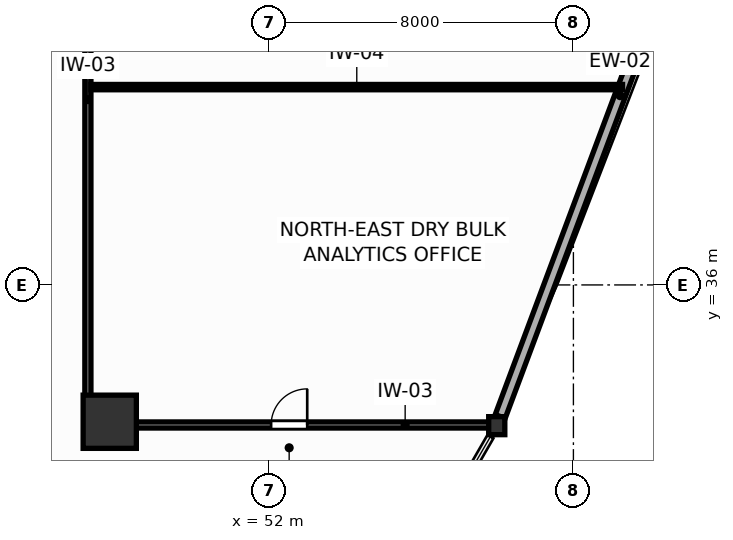
"""IFC4 building model, lengths in metres.
Left out: names, types, materials, properties, quantities, classifications, styles, units other than length and angle.
Written with IfcOpenShell. Run it as: python <this file> out.ifc"""

import sys

from ifc_helpers import new_model, si_unit, direction, frame, frame_2d, origin, origin_2d, place, context, subcontext, project, spatial, rectangle, i_section, extrude, source, transform, mapped, element, fill, save


model = new_model("IFC4")
c1 = context("Model", 3, precision=1e-05, world=origin(), true_north=direction((0.0, 1.0)))
c2 = subcontext(c1, "Body", "Model", "MODEL_VIEW")
j1 = project(units=[si_unit("LENGTHUNIT", "METRE"), si_unit("PLANEANGLEUNIT", "RADIAN")], contexts=[c1])
p1 = place(None, origin())
s1 = spatial("IfcSite", under=j1, at=p1, CompositionType="ELEMENT")
p2 = place(p1, origin())
s2 = spatial("IfcBuilding", under=s1, at=p2, CompositionType="ELEMENT")
p3 = place(p2, frame((0.0, 0.0, 47.4)))
s3 = spatial("IfcBuildingStorey", under=s2, at=p3, CompositionType="ELEMENT", Elevation=47.4)
m1 = source(origin(), c2, "Body", "SweptSolid", [
    extrude(rectangle(XDim=1.4, YDim=1.4, at=origin_2d()), origin(), (0.0, 0.0, 1.0), 3.9),
])
p4 = place(p3, frame((47.8, 32.4, 0.0), z_axis=(0.0, 0.0, 1.0), x_axis=(1.0, 0.0, 0.0)))
e1 = element("IfcColumn", 1, at=p4, inside=s3, PredefinedType="COLUMN", context=c2, shape_type="MappedRepresentation", body=[
    mapped(m1, transform((0.0, 0.0, 0.0), scale=1.0)),
])
m2 = source(origin(), c2, "Body", "SweptSolid", [
    extrude(i_section(OverallWidth=0.424, OverallDepth=0.474, WebThickness=0.045, FlangeThickness=0.072, FilletRadius=0.015, at=origin_2d()), origin(), (0.0, 0.0, 1.0), 3.9),
])
p5 = place(p3, frame((57.983, 32.297, 0.0), z_axis=(0.0, 0.0, 1.0), x_axis=(1.0, 0.0, 0.0)))
e2 = element("IfcColumn", 2, at=p5, inside=s3, PredefinedType="COLUMN", context=c2, shape_type="MappedRepresentation", body=[
    mapped(m2, transform((0.0, 0.0, 0.0), scale=1.0)),
])
p6 = place(p3, frame((58.074, 32.539, 0.0), z_axis=(0.0, 0.0, 1.0), x_axis=(0.350140465982, 0.936697205121, 0.0)))
e3 = element("IfcWall", 3, at=p6, inside=s3, PredefinedType="SOLIDWALL", context=c2, shape_type="SweptSolid", body=[
    extrude(rectangle(XDim=18.022, YDim=0.28, at=frame_2d((9.011, 0.0))), origin(), (0.0, 0.0, 1.0), 3.23),
])
p7 = place(p3, frame((47.225, 32.31, 0.0), z_axis=(0.0, 0.0, 1.0), x_axis=(0.0, 1.0, 0.0)))
e4 = element("IfcWall", 4, at=p7, inside=s3, PredefinedType="PARTITIONING", context=c2, shape_type="SweptSolid", body=[
    extrude(rectangle(XDim=23.984, YDim=0.16, at=frame_2d((11.992, 0.0))), origin(), (0.0, 0.0, 1.0), 3.68),
])
p8 = place(p7, frame((17.311, 0.0, 0.0)))
e5 = element("IfcOpeningElement", 5, at=p8, cuts=e4, PredefinedType="OPENING", context=c2, shape_type="SweptSolid", body=[
    extrude(rectangle(XDim=0.95, YDim=2.05, at=frame_2d((0.475, 1.025))), frame((0.0, 0.09, 0.0), z_axis=(0.0, -1.0, 0.0), x_axis=(1.0, 0.0, 0.0)), (0.0, 0.0, 1.0), 0.18),
])
p9 = place(p3, frame((47.307, 32.315, 0.0), z_axis=(0.0, 0.0, 1.0), x_axis=(1.0, 0.0, 0.0)))
e6 = element("IfcWall", 6, at=p9, inside=s3, PredefinedType="PARTITIONING", context=c2, shape_type="SweptSolid", body=[
    extrude(rectangle(XDim=10.663, YDim=0.16, at=frame_2d((5.332, 0.0))), origin(), (0.0, 0.0, 1.0), 3.18),
])
p10 = place(p9, frame((4.739, 0.0, 0.0)))
e7 = element("IfcOpeningElement", 7, at=p10, cuts=e6, PredefinedType="OPENING", context=c2, shape_type="SweptSolid", body=[
    extrude(rectangle(XDim=0.95, YDim=2.05, at=frame_2d((0.475, 1.025))), frame((0.0, 0.09, 0.0), z_axis=(0.0, -1.0, 0.0), x_axis=(1.0, 0.0, 0.0)), (0.0, 0.0, 1.0), 0.18),
])
p11 = place(p3, frame((47.307, 41.205, 0.0), z_axis=(0.0, 0.0, 1.0), x_axis=(1.0, 0.0, 0.0)))
e8 = element("IfcWall", 8, at=p11, inside=s3, PredefinedType="PARTITIONING", context=c2, shape_type="SweptSolid", body=[
    extrude(rectangle(XDim=13.986, YDim=0.14, at=frame_2d((6.993, 0.0))), origin(), (0.0, 0.0, 1.0), 3.68),
])
p12 = place(p10, origin())
e9 = element("IfcDoor", 9, at=p12, inside=s3, OperationType="SINGLE_SWING_RIGHT", PredefinedType="DOOR", context=c2, shape_type="SweptSolid", body=[
    extrude(rectangle(XDim=0.95, YDim=2.05, at=frame_2d((0.475, 1.025))), frame((0.0, 0.025, 0.0), z_axis=(0.0, -1.0, 0.0), x_axis=(1.0, 0.0, 0.0)), (0.0, 0.0, 1.0), 0.05),
])
fill(e7, e9)
save(model, sys.argv[1])
